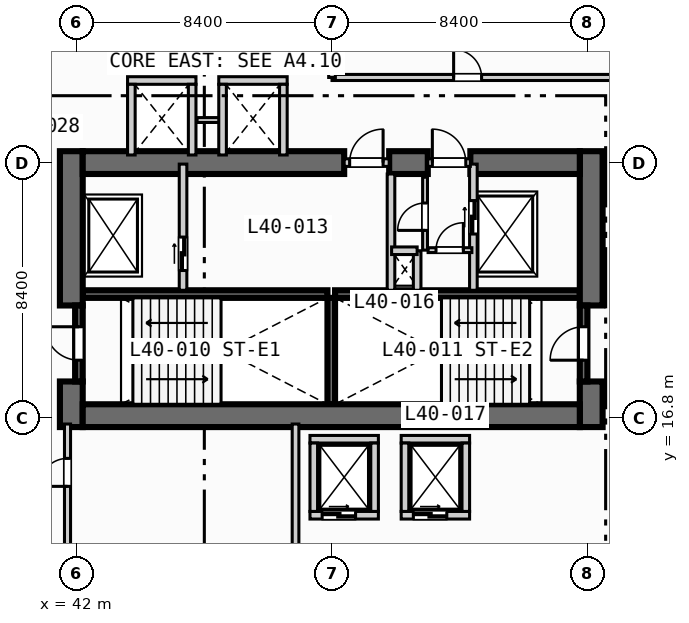
"""IFC4 building model, lengths in metres.
Left out: names, types, materials, properties, quantities, classifications, styles, units other than length and angle.
Written with IfcOpenShell. Run it as: python <this file> out.ifc"""

import sys

from ifc_helpers import new_model, si_unit, direction, frame, frame_2d, origin, place, context, subcontext, project, spatial, rectangle, extrude, element, fill, save


model = new_model("IFC4")
c1 = context("Model", 3, precision=1e-05, world=origin(), true_north=direction((0.0, 1.0)))
c2 = subcontext(c1, "Body", "Model", "MODEL_VIEW")
j1 = project(units=[si_unit("LENGTHUNIT", "METRE"), si_unit("PLANEANGLEUNIT", "RADIAN")], contexts=[c1])
p1 = place(None, origin())
s1 = spatial("IfcSite", under=j1, at=p1, CompositionType="ELEMENT")
p2 = place(p1, origin())
s2 = spatial("IfcBuilding", under=s1, at=p2, CompositionType="ELEMENT")
p3 = place(p2, frame((0.0, 0.0, 168.0)))
s3 = spatial("IfcBuildingStorey", under=s2, at=p3, CompositionType="ELEMENT", Elevation=168.0)
for number, where, z_axis, x_axis in (
    (1, (42.2, 20.875, 0.0), (0.0, 0.0, 1.0), (1.0, 0.0, 0.0)),
    (2, (50.5, 20.875, 0.0), (0.0, 0.0, 1.0), (1.0, 0.0, 0.0)),
):
    element("IfcWall", number, at=place(p3, frame(where, z_axis=z_axis, x_axis=x_axis)), inside=s3, PredefinedType="SOLIDWALL", context=c2, shape_type="SweptSolid", body=[
        extrude(rectangle(XDim=8.05, YDim=0.25, at=frame_2d((4.025, 0.0))), origin(), (0.0, 0.0, 1.0), 3.47),
    ])
p4 = place(p3, frame((50.375, 17.25, 0.0), z_axis=(0.0, 0.0, 1.0), x_axis=(0.0, 1.0, 0.0)))
e3 = element("IfcWall", 3, at=p4, inside=s3, PredefinedType="SOLIDWALL", context=c2, shape_type="SweptSolid", body=[
    extrude(rectangle(XDim=3.5, YDim=0.25, at=frame_2d((1.75, 0.0))), origin(), (0.0, 0.0, 1.0), 3.47),
])
p5 = place(p3, frame((41.825, 16.5, 0.0), z_axis=(0.0, 0.0, 1.0), x_axis=(0.0, 1.0, 0.0)))
e4 = element("IfcWall", 4, at=p5, inside=s3, PredefinedType="SHEAR", context=c2, shape_type="SweptSolid", body=[
    extrude(rectangle(XDim=1.5, YDim=0.75, at=frame_2d((0.75, 0.0))), origin(), (0.0, 0.0, 1.0), 3.47),
])
p6 = place(p3, frame((41.825, 20.5, 0.0), z_axis=(0.0, 0.0, 1.0), x_axis=(0.0, 1.0, 0.0)))
e5 = element("IfcWall", 5, at=p6, inside=s3, PredefinedType="SHEAR", context=c2, shape_type="SweptSolid", body=[
    extrude(rectangle(XDim=5.075, YDim=0.75, at=frame_2d((2.538, 0.0))), origin(), (0.0, 0.0, 1.0), 3.47),
])
p7 = place(p3, frame((58.925, 16.5, 0.0), z_axis=(0.0, 0.0, 1.0), x_axis=(0.0, 1.0, 0.0)))
e6 = element("IfcWall", 6, at=p7, inside=s3, PredefinedType="SHEAR", context=c2, shape_type="SweptSolid", body=[
    extrude(rectangle(XDim=1.5, YDim=0.75, at=frame_2d((0.75, 0.0))), origin(), (0.0, 0.0, 1.0), 3.47),
])
p8 = place(p3, frame((58.925, 20.5, 0.0), z_axis=(0.0, 0.0, 1.0), x_axis=(0.0, 1.0, 0.0)))
e7 = element("IfcWall", 7, at=p8, inside=s3, PredefinedType="SHEAR", context=c2, shape_type="SweptSolid", body=[
    extrude(rectangle(XDim=5.075, YDim=0.75, at=frame_2d((2.538, 0.0))), origin(), (0.0, 0.0, 1.0), 3.47),
])
p9 = place(p3, frame((42.2, 16.875, 0.0), z_axis=(0.0, 0.0, 1.0), x_axis=(1.0, 0.0, 0.0)))
e8 = element("IfcWall", 8, at=p9, inside=s3, PredefinedType="SHEAR", context=c2, shape_type="SweptSolid", body=[
    extrude(rectangle(XDim=16.35, YDim=0.75, at=frame_2d((8.175, 0.0))), origin(), (0.0, 0.0, 1.0), 3.47),
])
p10 = place(p3, frame((42.2, 25.2, 0.0), z_axis=(0.0, 0.0, 1.0), x_axis=(1.0, 0.0, 0.0)))
e9 = element("IfcWall", 9, at=p10, inside=s3, PredefinedType="SHEAR", context=c2, shape_type="SweptSolid", body=[
    extrude(rectangle(XDim=8.6, YDim=0.75, at=frame_2d((4.3, 0.0))), origin(), (0.0, 0.0, 1.0), 3.47),
])
p11 = place(p3, frame((52.28, 25.2, 0.0), z_axis=(0.0, 0.0, 1.0), x_axis=(1.0, 0.0, 0.0)))
e10 = element("IfcWall", 10, at=p11, inside=s3, PredefinedType="SHEAR", context=c2, shape_type="SweptSolid", body=[
    extrude(rectangle(XDim=1.27, YDim=0.75, at=frame_2d((0.635, 0.0))), origin(), (0.0, 0.0, 1.0), 3.47),
])
p12 = place(p3, frame((54.95, 25.2, 0.0), z_axis=(0.0, 0.0, 1.0), x_axis=(1.0, 0.0, 0.0)))
e11 = element("IfcWall", 11, at=p12, inside=s3, PredefinedType="SHEAR", context=c2, shape_type="SweptSolid", body=[
    extrude(rectangle(XDim=3.6, YDim=0.75, at=frame_2d((1.8, 0.0))), origin(), (0.0, 0.0, 1.0), 3.47),
])
p13 = place(p3, frame((42.075, 18.0, 0.0), z_axis=(0.0, 0.0, 1.0), x_axis=(0.0, 1.0, 0.0)))
e12 = element("IfcWall", 12, at=p13, inside=s3, PredefinedType="SOLIDWALL", context=c2, shape_type="SweptSolid", body=[
    extrude(rectangle(XDim=2.5, YDim=0.25, at=frame_2d((1.25, 0.0))), origin(), (0.0, 0.0, 1.0), 3.47),
])
p14 = place(p13, frame((0.7, 0.0, 0.0)))
e13 = element("IfcOpeningElement", 13, at=p14, cuts=e12, PredefinedType="OPENING", context=c2, shape_type="SweptSolid", body=[
    extrude(rectangle(XDim=1.1, YDim=2.15, at=frame_2d((0.55, 1.075))), frame((0.0, 0.135, 0.0), z_axis=(0.0, -1.0, 0.0), x_axis=(1.0, 0.0, 0.0)), (0.0, 0.0, 1.0), 0.27),
])
p15 = place(p3, frame((58.675, 18.0, 0.0), z_axis=(0.0, 0.0, 1.0), x_axis=(0.0, 1.0, 0.0)))
e14 = element("IfcWall", 14, at=p15, inside=s3, PredefinedType="SOLIDWALL", context=c2, shape_type="SweptSolid", body=[
    extrude(rectangle(XDim=2.5, YDim=0.25, at=frame_2d((1.25, 0.0))), origin(), (0.0, 0.0, 1.0), 3.47),
])
p16 = place(p15, frame((0.7, 0.0, 0.0)))
e15 = element("IfcOpeningElement", 15, at=p16, cuts=e14, PredefinedType="OPENING", context=c2, shape_type="SweptSolid", body=[
    extrude(rectangle(XDim=1.1, YDim=2.15, at=frame_2d((0.55, 1.075))), frame((0.0, 0.135, 0.0), z_axis=(0.0, -1.0, 0.0), x_axis=(1.0, 0.0, 0.0)), (0.0, 0.0, 1.0), 0.27),
])
p17 = place(p3, frame((45.5, 21.0, 0.0), z_axis=(0.0, 0.0, 1.0), x_axis=(0.0, 1.0, 0.0)))
e16 = element("IfcWall", 16, at=p17, inside=s3, PredefinedType="SOLIDWALL", context=c2, shape_type="SweptSolid", body=[
    extrude(rectangle(XDim=4.15, YDim=0.25, at=frame_2d((2.075, 0.0))), origin(), (0.0, 0.0, 1.0), 3.47),
])
p18 = place(p17, frame((0.65, 0.0, 0.0)))
e17 = element("IfcOpeningElement", 17, at=p18, cuts=e16, PredefinedType="OPENING", context=c2, shape_type="SweptSolid", body=[
    extrude(rectangle(XDim=1.1, YDim=2.15, at=frame_2d((0.55, 1.075))), frame((0.0, 0.135, 0.0), z_axis=(0.0, -1.0, 0.0), x_axis=(1.0, 0.0, 0.0)), (0.0, 0.0, 1.0), 0.27),
])
p19 = place(p3, frame((50.8, 25.2, 0.0), z_axis=(0.0, 0.0, 1.0), x_axis=(1.0, 0.0, 0.0)))
e18 = element("IfcWall", 18, at=p19, inside=s3, PredefinedType="SOLIDWALL", context=c2, shape_type="SweptSolid", body=[
    extrude(rectangle(XDim=1.48, YDim=0.25, at=frame_2d((0.74, 0.0))), origin(), (0.0, 0.0, 1.0), 3.47),
])
p20 = place(p19, frame((0.18, 0.0, 0.0)))
e19 = element("IfcOpeningElement", 19, at=p20, cuts=e18, PredefinedType="OPENING", context=c2, shape_type="SweptSolid", body=[
    extrude(rectangle(XDim=1.1, YDim=2.15, at=frame_2d((0.55, 1.075))), frame((0.0, 0.135, 0.0), z_axis=(0.0, -1.0, 0.0), x_axis=(1.0, 0.0, 0.0)), (0.0, 0.0, 1.0), 0.27),
])
p21 = place(p3, frame((52.34, 21.0, 0.0), z_axis=(0.0, 0.0, 1.0), x_axis=(0.0, 1.0, 0.0)))
e20 = element("IfcWall", 20, at=p21, inside=s3, PredefinedType="SOLIDWALL", context=c2, shape_type="SweptSolid", body=[
    extrude(rectangle(XDim=3.825, YDim=0.25, at=frame_2d((1.913, 0.0))), origin(), (0.0, 0.0, 1.0), 3.47),
])
p22 = place(p3, frame((55.05, 21.0, 0.0), z_axis=(0.0, 0.0, 1.0), x_axis=(0.0, 1.0, 0.0)))
e21 = element("IfcWall", 21, at=p22, inside=s3, PredefinedType="SOLIDWALL", context=c2, shape_type="SweptSolid", body=[
    extrude(rectangle(XDim=4.15, YDim=0.25, at=frame_2d((2.075, 0.0))), origin(), (0.0, 0.0, 1.0), 3.47),
])
p23 = place(p22, frame((1.85, 0.0, 0.0)))
e22 = element("IfcOpeningElement", 22, at=p23, cuts=e21, PredefinedType="OPENING", context=c2, shape_type="SweptSolid", body=[
    extrude(rectangle(XDim=1.1, YDim=2.15, at=frame_2d((0.55, 1.075))), frame((0.0, 0.135, 0.0), z_axis=(0.0, -1.0, 0.0), x_axis=(1.0, 0.0, 0.0)), (0.0, 0.0, 1.0), 0.27),
])
p24 = place(p3, frame((53.55, 25.2, 0.0), z_axis=(0.0, 0.0, 1.0), x_axis=(1.0, 0.0, 0.0)))
e23 = element("IfcWall", 23, at=p24, inside=s3, PredefinedType="SOLIDWALL", context=c2, shape_type="SweptSolid", body=[
    extrude(rectangle(XDim=1.4, YDim=0.25, at=frame_2d((0.7, 0.0))), origin(), (0.0, 0.0, 1.0), 3.47),
])
p25 = place(p24, frame((0.15, 0.0, 0.0)))
e24 = element("IfcOpeningElement", 24, at=p25, cuts=e23, PredefinedType="OPENING", context=c2, shape_type="SweptSolid", body=[
    extrude(rectangle(XDim=1.1, YDim=2.15, at=frame_2d((0.55, 1.075))), frame((0.0, 0.135, 0.0), z_axis=(0.0, -1.0, 0.0), x_axis=(1.0, 0.0, 0.0)), (0.0, 0.0, 1.0), 0.27),
])
p26 = place(p3, frame((53.2, 21.0, 0.0), z_axis=(0.0, 0.0, 1.0), x_axis=(0.0, 1.0, 0.0)))
e25 = element("IfcWall", 25, at=p26, inside=s3, PredefinedType="SOLIDWALL", context=c2, shape_type="SweptSolid", body=[
    extrude(rectangle(XDim=1.3, YDim=0.25, at=frame_2d((0.65, 0.0))), origin(), (0.0, 0.0, 1.0), 3.47),
])
p27 = place(p3, frame((52.36, 22.3, 0.0), z_axis=(0.0, 0.0, 1.0), x_axis=(1.0, 0.0, 0.0)))
e26 = element("IfcWall", 26, at=p27, inside=s3, PredefinedType="SOLIDWALL", context=c2, shape_type="SweptSolid", body=[
    extrude(rectangle(XDim=0.84, YDim=0.25, at=frame_2d((0.42, 0.0))), origin(), (0.0, 0.0, 1.0), 3.47),
])
p28 = place(p3, frame((53.56, 22.32, 0.0), z_axis=(0.0, 0.0, 1.0), x_axis=(1.0, 0.0, 0.0)))
e27 = element("IfcWall", 27, at=p28, inside=s3, PredefinedType="PARTITIONING", context=c2, shape_type="SweptSolid", body=[
    extrude(rectangle(XDim=1.44, YDim=0.16, at=frame_2d((0.72, 0.0))), origin(), (0.0, 0.0, 1.0), 3.47),
])
p29 = place(p28, frame((0.26, 0.0, 0.0)))
e28 = element("IfcOpeningElement", 28, at=p29, cuts=e27, PredefinedType="OPENING", context=c2, shape_type="SweptSolid", body=[
    extrude(rectangle(XDim=0.9, YDim=2.1, at=frame_2d((0.45, 1.05))), frame((0.0, 0.09, 0.0), z_axis=(0.0, -1.0, 0.0), x_axis=(1.0, 0.0, 0.0)), (0.0, 0.0, 1.0), 0.18),
])
p30 = place(p3, frame((53.46, 22.32, 0.0), z_axis=(0.0, 0.0, 1.0), x_axis=(0.0, 1.0, 0.0)))
e29 = element("IfcWall", 29, at=p30, inside=s3, PredefinedType="PARTITIONING", context=c2, shape_type="SweptSolid", body=[
    extrude(rectangle(XDim=2.4, YDim=0.16, at=frame_2d((1.2, 0.0))), origin(), (0.0, 0.0, 1.0), 3.47),
])
p31 = place(p30, frame((0.65, 0.0, 0.0)))
e30 = element("IfcOpeningElement", 30, at=p31, cuts=e29, PredefinedType="OPENING", context=c2, shape_type="SweptSolid", body=[
    extrude(rectangle(XDim=0.9, YDim=2.1, at=frame_2d((0.45, 1.05))), frame((0.0, 0.09, 0.0), z_axis=(0.0, -1.0, 0.0), x_axis=(1.0, 0.0, 0.0)), (0.0, 0.0, 1.0), 0.18),
])
p32 = place(p3, frame((49.675, 13.6, 0.0), z_axis=(0.0, 0.0, 1.0), x_axis=(1.0, 0.0, 0.0)))
e31 = element("IfcWall", 31, at=p32, inside=s3, PredefinedType="SOLIDWALL", context=c2, shape_type="SweptSolid", body=[
    extrude(rectangle(XDim=2.25, YDim=0.25, at=frame_2d((1.125, 0.0))), origin(), (0.0, 0.0, 1.0), 3.47),
])
p33 = place(p32, frame((0.4, 0.0, 0.0)))
e32 = element("IfcOpeningElement", 32, at=p33, cuts=e31, PredefinedType="OPENING", context=c2, shape_type="SweptSolid", body=[
    extrude(rectangle(XDim=1.1, YDim=2.15, at=frame_2d((0.55, 1.075))), frame((0.0, 0.135, 0.0), z_axis=(0.0, -1.0, 0.0), x_axis=(1.0, 0.0, 0.0)), (0.0, 0.0, 1.0), 0.27),
])
for number, where, z_axis, x_axis in (
    (33, (49.675, 16.1, 0.0), (0.0, 0.0, 1.0), (1.0, 0.0, 0.0)),
    (34, (49.8, 13.725, 0.0), (0.0, 0.0, 1.0), (0.0, 1.0, 0.0)),
    (35, (51.8, 13.725, 0.0), (0.0, 0.0, 1.0), (0.0, 1.0, 0.0)),
):
    element("IfcWall", number, at=place(p3, frame(where, z_axis=z_axis, x_axis=x_axis)), inside=s3, PredefinedType="SOLIDWALL", context=c2, shape_type="SweptSolid", body=[
        extrude(rectangle(XDim=2.25, YDim=0.25, at=frame_2d((1.125, 0.0))), origin(), (0.0, 0.0, 1.0), 3.47),
    ])
p34 = place(p3, frame((52.675, 13.6, 0.0), z_axis=(0.0, 0.0, 1.0), x_axis=(1.0, 0.0, 0.0)))
e36 = element("IfcWall", 36, at=p34, inside=s3, PredefinedType="SOLIDWALL", context=c2, shape_type="SweptSolid", body=[
    extrude(rectangle(XDim=2.25, YDim=0.25, at=frame_2d((1.125, 0.0))), origin(), (0.0, 0.0, 1.0), 3.47),
])
p35 = place(p34, frame((0.4, 0.0, 0.0)))
e37 = element("IfcOpeningElement", 37, at=p35, cuts=e36, PredefinedType="OPENING", context=c2, shape_type="SweptSolid", body=[
    extrude(rectangle(XDim=1.1, YDim=2.15, at=frame_2d((0.55, 1.075))), frame((0.0, 0.135, 0.0), z_axis=(0.0, -1.0, 0.0), x_axis=(1.0, 0.0, 0.0)), (0.0, 0.0, 1.0), 0.27),
])
for number, where, z_axis, x_axis in (
    (38, (52.675, 16.1, 0.0), (0.0, 0.0, 1.0), (1.0, 0.0, 0.0)),
    (39, (52.8, 13.725, 0.0), (0.0, 0.0, 1.0), (0.0, 1.0, 0.0)),
    (40, (54.8, 13.725, 0.0), (0.0, 0.0, 1.0), (0.0, 1.0, 0.0)),
    (41, (43.675, 27.9, 0.0), (0.0, 0.0, 1.0), (1.0, 0.0, 0.0)),
):
    element("IfcWall", number, at=place(p3, frame(where, z_axis=z_axis, x_axis=x_axis)), inside=s3, PredefinedType="SOLIDWALL", context=c2, shape_type="SweptSolid", body=[
        extrude(rectangle(XDim=2.25, YDim=0.25, at=frame_2d((1.125, 0.0))), origin(), (0.0, 0.0, 1.0), 3.47),
    ])
for number, where, z_axis, x_axis in (
    (42, (43.8, 25.45, 0.0), (0.0, 0.0, 1.0), (0.0, 1.0, 0.0)),
    (43, (45.8, 25.45, 0.0), (0.0, 0.0, 1.0), (0.0, 1.0, 0.0)),
):
    element("IfcWall", number, at=place(p3, frame(where, z_axis=z_axis, x_axis=x_axis)), inside=s3, PredefinedType="SOLIDWALL", context=c2, shape_type="SweptSolid", body=[
        extrude(rectangle(XDim=2.325, YDim=0.25, at=frame_2d((1.163, 0.0))), origin(), (0.0, 0.0, 1.0), 3.47),
    ])
p36 = place(p3, frame((45.96, 26.6, 0.0), z_axis=(0.0, 0.0, 1.0), x_axis=(1.0, 0.0, 0.0)))
e44 = element("IfcWall", 44, at=p36, inside=s3, PredefinedType="PARTITIONING", context=c2, shape_type="SweptSolid", body=[
    extrude(rectangle(XDim=0.88, YDim=0.16, at=frame_2d((0.44, 0.0))), origin(), (0.0, 0.0, 1.0), 3.47),
])
p37 = place(p3, frame((46.675, 27.9, 0.0), z_axis=(0.0, 0.0, 1.0), x_axis=(1.0, 0.0, 0.0)))
e45 = element("IfcWall", 45, at=p37, inside=s3, PredefinedType="SOLIDWALL", context=c2, shape_type="SweptSolid", body=[
    extrude(rectangle(XDim=2.25, YDim=0.25, at=frame_2d((1.125, 0.0))), origin(), (0.0, 0.0, 1.0), 3.47),
])
for number, where, z_axis, x_axis in (
    (46, (46.8, 25.45, 0.0), (0.0, 0.0, 1.0), (0.0, 1.0, 0.0)),
    (47, (48.8, 25.45, 0.0), (0.0, 0.0, 1.0), (0.0, 1.0, 0.0)),
):
    element("IfcWall", number, at=place(p3, frame(where, z_axis=z_axis, x_axis=x_axis)), inside=s3, PredefinedType="SOLIDWALL", context=c2, shape_type="SweptSolid", body=[
        extrude(rectangle(XDim=2.325, YDim=0.25, at=frame_2d((1.163, 0.0))), origin(), (0.0, 0.0, 1.0), 3.47),
    ])
p38 = place(p3, frame((41.7, 0.35, 0.0), z_axis=(0.0, 0.0, 1.0), x_axis=(0.0, 1.0, 0.0)))
e48 = element("IfcWall", 48, at=p38, inside=s3, PredefinedType="PARTITIONING", context=c2, shape_type="SweptSolid", body=[
    extrude(rectangle(XDim=16.25, YDim=0.2, at=frame_2d((8.125, 0.0))), origin(), (0.0, 0.0, 1.0), 2.82),
])
p39 = place(p38, frame((14.2, 0.0, 0.0)))
e49 = element("IfcOpeningElement", 49, at=p39, cuts=e48, PredefinedType="OPENING", context=c2, shape_type="SweptSolid", body=[
    extrude(rectangle(XDim=0.92, YDim=2.1, at=frame_2d((0.46, 1.05))), frame((0.0, 0.11, 0.0), z_axis=(0.0, -1.0, 0.0), x_axis=(1.0, 0.0, 0.0)), (0.0, 0.0, 1.0), 0.22),
])
p40 = place(p3, frame((49.2, 0.35, 0.0), z_axis=(0.0, 0.0, 1.0), x_axis=(0.0, 1.0, 0.0)))
e50 = element("IfcWall", 50, at=p40, inside=s3, PredefinedType="PARTITIONING", context=c2, shape_type="SweptSolid", body=[
    extrude(rectangle(XDim=16.25, YDim=0.22, at=frame_2d((8.125, 0.0))), origin(), (0.0, 0.0, 1.0), 3.47),
])
p41 = place(p3, frame((50.4, 28.0, 0.0), z_axis=(0.0, 0.0, 1.0), x_axis=(1.0, 0.0, 0.0)))
e51 = element("IfcWall", 51, at=p41, inside=s3, PredefinedType="PARTITIONING", context=c2, shape_type="SweptSolid", body=[
    extrude(rectangle(XDim=21.8, YDim=0.2, at=frame_2d((10.9, 0.0))), origin(), (0.0, 0.0, 1.0), 3.47),
])
p42 = place(p41, frame((4.0, 0.0, 0.0)))
e52 = element("IfcOpeningElement", 52, at=p42, cuts=e51, PredefinedType="OPENING", context=c2, shape_type="SweptSolid", body=[
    extrude(rectangle(XDim=0.92, YDim=2.1, at=frame_2d((0.46, 1.05))), frame((0.0, 0.11, 0.0), z_axis=(0.0, -1.0, 0.0), x_axis=(1.0, 0.0, 0.0)), (0.0, 0.0, 1.0), 0.22),
])
p43 = place(p3, frame((50.4, 28.0, 0.0), z_axis=(0.0, 0.0, 1.0), x_axis=(0.0, 1.0, 0.0)))
e53 = element("IfcWall", 53, at=p43, inside=s3, PredefinedType="PARTITIONING", context=c2, shape_type="SweptSolid", body=[
    extrude(rectangle(XDim=5.3, YDim=0.22, at=frame_2d((2.65, 0.0))), origin(), (0.0, 0.0, 1.0), 2.82),
])
p44 = place(p14, origin())
e54 = element("IfcDoor", 54, at=p44, inside=s3, OperationType="SINGLE_SWING_RIGHT", PredefinedType="DOOR", context=c2, shape_type="SweptSolid", body=[
    extrude(rectangle(XDim=1.1, YDim=2.15, at=frame_2d((0.55, 1.075))), frame((0.0, 0.025, 0.0), z_axis=(0.0, -1.0, 0.0), x_axis=(1.0, 0.0, 0.0)), (0.0, 0.0, 1.0), 0.05),
])
fill(e13, e54)
p45 = place(p16, origin())
e55 = element("IfcDoor", 55, at=p45, inside=s3, OperationType="SINGLE_SWING_LEFT", PredefinedType="DOOR", context=c2, shape_type="SweptSolid", body=[
    extrude(rectangle(XDim=1.1, YDim=2.15, at=frame_2d((0.55, 1.075))), frame((0.0, 0.025, 0.0), z_axis=(0.0, -1.0, 0.0), x_axis=(1.0, 0.0, 0.0)), (0.0, 0.0, 1.0), 0.05),
])
fill(e15, e55)
p46 = place(p18, origin())
e56 = element("IfcDoor", 56, at=p46, inside=s3, OperationType="SLIDING_TO_LEFT", PredefinedType="DOOR", context=c2, shape_type="SweptSolid", body=[
    extrude(rectangle(XDim=1.1, YDim=2.15, at=frame_2d((0.55, 1.075))), frame((0.0, 0.025, 0.0), z_axis=(0.0, -1.0, 0.0), x_axis=(1.0, 0.0, 0.0)), (0.0, 0.0, 1.0), 0.05),
])
fill(e17, e56)
p47 = place(p20, origin())
e57 = element("IfcDoor", 57, at=p47, inside=s3, OperationType="SINGLE_SWING_RIGHT", PredefinedType="DOOR", context=c2, shape_type="SweptSolid", body=[
    extrude(rectangle(XDim=1.1, YDim=2.15, at=frame_2d((0.55, 1.075))), frame((0.0, 0.025, 0.0), z_axis=(0.0, -1.0, 0.0), x_axis=(1.0, 0.0, 0.0)), (0.0, 0.0, 1.0), 0.05),
])
fill(e19, e57)
p48 = place(p23, origin())
e58 = element("IfcDoor", 58, at=p48, inside=s3, OperationType="SLIDING_TO_LEFT", PredefinedType="DOOR", context=c2, shape_type="SweptSolid", body=[
    extrude(rectangle(XDim=1.1, YDim=2.15, at=frame_2d((0.55, 1.075))), frame((0.0, 0.025, 0.0), z_axis=(0.0, -1.0, 0.0), x_axis=(1.0, 0.0, 0.0)), (0.0, 0.0, 1.0), 0.05),
])
fill(e22, e58)
p49 = place(p25, origin())
e59 = element("IfcDoor", 59, at=p49, inside=s3, OperationType="SINGLE_SWING_LEFT", PredefinedType="DOOR", context=c2, shape_type="SweptSolid", body=[
    extrude(rectangle(XDim=1.1, YDim=2.15, at=frame_2d((0.55, 1.075))), frame((0.0, 0.025, 0.0), z_axis=(0.0, -1.0, 0.0), x_axis=(1.0, 0.0, 0.0)), (0.0, 0.0, 1.0), 0.05),
])
fill(e24, e59)
p50 = place(p29, origin())
e60 = element("IfcDoor", 60, at=p50, inside=s3, OperationType="SINGLE_SWING_RIGHT", PredefinedType="DOOR", context=c2, shape_type="SweptSolid", body=[
    extrude(rectangle(XDim=0.9, YDim=2.1, at=frame_2d((0.45, 1.05))), frame((0.0, 0.025, 0.0), z_axis=(0.0, -1.0, 0.0), x_axis=(1.0, 0.0, 0.0)), (0.0, 0.0, 1.0), 0.05),
])
fill(e28, e60)
p51 = place(p31, origin())
e61 = element("IfcDoor", 61, at=p51, inside=s3, OperationType="SINGLE_SWING_LEFT", PredefinedType="DOOR", context=c2, shape_type="SweptSolid", body=[
    extrude(rectangle(XDim=0.9, YDim=2.1, at=frame_2d((0.45, 1.05))), frame((0.0, 0.025, 0.0), z_axis=(0.0, -1.0, 0.0), x_axis=(1.0, 0.0, 0.0)), (0.0, 0.0, 1.0), 0.05),
])
fill(e30, e61)
p52 = place(p33, origin())
e62 = element("IfcDoor", 62, at=p52, inside=s3, OperationType="SLIDING_TO_LEFT", PredefinedType="DOOR", context=c2, shape_type="SweptSolid", body=[
    extrude(rectangle(XDim=1.1, YDim=2.15, at=frame_2d((0.55, 1.075))), frame((0.0, 0.025, 0.0), z_axis=(0.0, -1.0, 0.0), x_axis=(1.0, 0.0, 0.0)), (0.0, 0.0, 1.0), 0.05),
])
fill(e32, e62)
p53 = place(p35, origin())
e63 = element("IfcDoor", 63, at=p53, inside=s3, OperationType="SLIDING_TO_LEFT", PredefinedType="DOOR", context=c2, shape_type="SweptSolid", body=[
    extrude(rectangle(XDim=1.1, YDim=2.15, at=frame_2d((0.55, 1.075))), frame((0.0, 0.025, 0.0), z_axis=(0.0, -1.0, 0.0), x_axis=(1.0, 0.0, 0.0)), (0.0, 0.0, 1.0), 0.05),
])
fill(e37, e63)
p54 = place(p39, origin())
e64 = element("IfcDoor", 64, at=p54, inside=s3, OperationType="SINGLE_SWING_LEFT", PredefinedType="DOOR", context=c2, shape_type="SweptSolid", body=[
    extrude(rectangle(XDim=0.92, YDim=2.1, at=frame_2d((0.46, 1.05))), frame((0.0, 0.025, 0.0), z_axis=(0.0, -1.0, 0.0), x_axis=(1.0, 0.0, 0.0)), (0.0, 0.0, 1.0), 0.05),
])
fill(e49, e64)
p55 = place(p42, origin())
e65 = element("IfcDoor", 65, at=p55, inside=s3, OperationType="SINGLE_SWING_LEFT", PredefinedType="DOOR", context=c2, shape_type="SweptSolid", body=[
    extrude(rectangle(XDim=0.92, YDim=2.1, at=frame_2d((0.46, 1.05))), frame((0.0, 0.025, 0.0), z_axis=(0.0, -1.0, 0.0), x_axis=(1.0, 0.0, 0.0)), (0.0, 0.0, 1.0), 0.05),
])
fill(e52, e65)
save(model, sys.argv[1])
